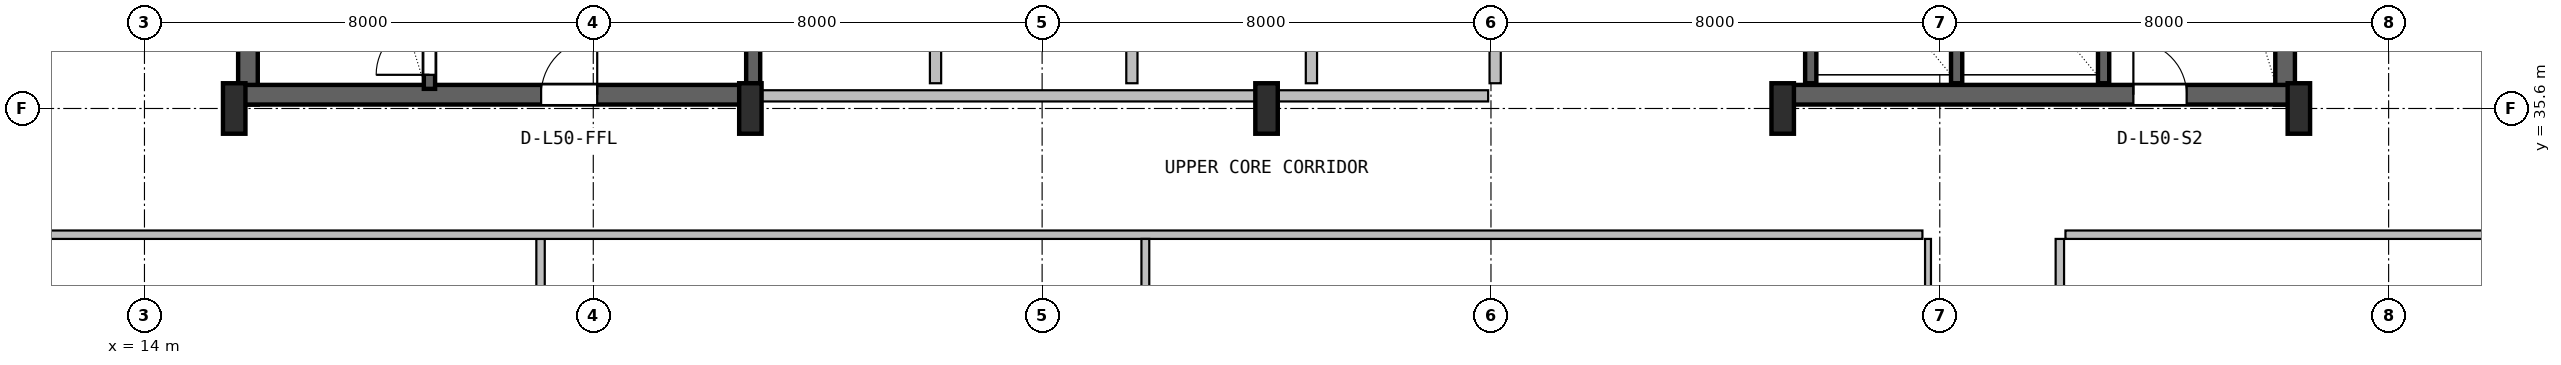
"""IFC4 building model, lengths in metres.
Left out: names, types, materials, properties, quantities, classifications, styles, units other than length and angle.
Written with IfcOpenShell. Run it as: python <this file> out.ifc"""

import sys

from ifc_helpers import new_model, si_unit, direction, frame, frame_2d, origin, origin_2d, place, context, subcontext, project, spatial, rectangle, i_section, extrude, source, transform, mapped, element, fill, save


model = new_model("IFC4")
c1 = context("Model", 3, precision=1e-05, world=origin(), true_north=direction((0.0, 1.0)))
c2 = subcontext(c1, "Body", "Model", "MODEL_VIEW")
j1 = project(units=[si_unit("LENGTHUNIT", "METRE"), si_unit("PLANEANGLEUNIT", "RADIAN")], contexts=[c1])
p1 = place(None, origin())
s1 = spatial("IfcSite", under=j1, at=p1, CompositionType="ELEMENT")
p2 = place(p1, origin())
s2 = spatial("IfcBuilding", under=s1, at=p2, CompositionType="ELEMENT")
p3 = place(p2, frame((0.0, 0.0, 203.6)))
s3 = spatial("IfcBuildingStorey", under=s2, at=p3, CompositionType="ELEMENT", Elevation=203.6)
for number, where, z_axis, x_axis in (
    (1, (15.845, 35.67, 0.0), (0.0, 0.0, 1.0), (0.0, 1.0, 0.0)),
    (2, (52.155, 35.67, 0.0), (0.0, 0.0, 1.0), (0.0, 1.0, 0.0)),
):
    element("IfcWall", number, at=place(p3, frame(where, z_axis=z_axis, x_axis=x_axis)), inside=s3, PredefinedType="SHEAR", context=c2, shape_type="SweptSolid", body=[
        extrude(rectangle(XDim=11.13, YDim=0.35, at=frame_2d((5.565, 0.0))), origin(), (0.0, 0.0, 1.0), 3.55),
    ])
p4 = place(p3, frame((15.67, 35.845, 0.0), z_axis=(0.0, 0.0, 1.0), x_axis=(1.0, 0.0, 0.0)))
e3 = element("IfcWall", 3, at=p4, inside=s3, PredefinedType="SHEAR", context=c2, shape_type="SweptSolid", body=[
    extrude(rectangle(XDim=9.13, YDim=0.35, at=frame_2d((4.565, 0.0))), origin(), (0.0, 0.0, 1.0), 3.55),
])
p5 = place(p4, frame((5.4, 0.0, 0.0)))
e4 = element("IfcOpeningElement", 4, at=p5, cuts=e3, PredefinedType="OPENING", context=c2, shape_type="SweptSolid", body=[
    extrude(rectangle(XDim=1.0, YDim=2.1, at=frame_2d((0.5, 1.05))), frame((0.0, 0.185, 0.0), z_axis=(0.0, -1.0, 0.0), x_axis=(1.0, 0.0, 0.0)), (0.0, 0.0, 1.0), 0.37),
])
p6 = place(p3, frame((43.2, 35.845, 0.0), z_axis=(0.0, 0.0, 1.0), x_axis=(1.0, 0.0, 0.0)))
e5 = element("IfcWall", 5, at=p6, inside=s3, PredefinedType="SHEAR", context=c2, shape_type="SweptSolid", body=[
    extrude(rectangle(XDim=9.13, YDim=0.35, at=frame_2d((4.565, 0.0))), origin(), (0.0, 0.0, 1.0), 3.55),
])
p7 = place(p6, frame((6.25, 0.0, 0.0)))
e6 = element("IfcOpeningElement", 6, at=p7, cuts=e5, PredefinedType="OPENING", context=c2, shape_type="SweptSolid", body=[
    extrude(rectangle(XDim=0.95, YDim=2.1, at=frame_2d((0.475, 1.05))), frame((0.0, 0.185, 0.0), z_axis=(0.0, -1.0, 0.0), x_axis=(1.0, 0.0, 0.0)), (0.0, 0.0, 1.0), 0.37),
])
m1 = source(origin(), c2, "Body", "SweptSolid", [
    extrude(i_section(OverallWidth=0.4, OverallDepth=0.9, WebThickness=0.016, FlangeThickness=0.028, FilletRadius=0.016, at=origin_2d()), origin(), (0.0, 0.0, 1.0), 3.8),
])
for number, where, z_axis, x_axis in (
    (7, (15.6, 35.6, 0.0), (0.0, 0.0, 1.0), (1.0, 0.0, 0.0)),
    (8, (24.8, 35.6, 0.0), (0.0, 0.0, 1.0), (1.0, 0.0, 0.0)),
    (9, (34.0, 35.6, 0.0), (0.0, 0.0, 1.0), (1.0, 0.0, 0.0)),
    (10, (43.2, 35.6, 0.0), (0.0, 0.0, 1.0), (1.0, 0.0, 0.0)),
    (11, (52.4, 35.6, 0.0), (0.0, 0.0, 1.0), (1.0, 0.0, 0.0)),
):
    element("IfcColumn", number, at=place(p3, frame(where, z_axis=z_axis, x_axis=x_axis)), inside=s3, PredefinedType="COLUMN", context=c2, shape_type="MappedRepresentation", body=[
        mapped(m1, transform((0.0, 0.0, 0.0), x_axis=(1.0, 0.0, 0.0), y_axis=(0.0, 1.0, 0.0), z_axis=(0.0, 0.0, 1.0), scale=1.0)),
    ])
p8 = place(p3, frame((19.08, 35.95, 0.0), z_axis=(0.0, 0.0, 1.0), x_axis=(0.0, 1.0, 0.0)))
e12 = element("IfcWall", 12, at=p8, inside=s3, PredefinedType="SHEAR", context=c2, shape_type="SweptSolid", body=[
    extrude(rectangle(XDim=9.65, YDim=0.2, at=frame_2d((4.825, 0.0))), origin(), (0.0, 0.0, 1.0), 3.55),
])
p9 = place(p8, frame((0.25, 0.0, 0.0)))
e13 = element("IfcOpeningElement", 13, at=p9, cuts=e12, PredefinedType="OPENING", context=c2, shape_type="SweptSolid", body=[
    extrude(rectangle(XDim=0.95, YDim=2.1, at=frame_2d((0.475, 1.05))), frame((0.0, 0.11, 0.0), z_axis=(0.0, -1.0, 0.0), x_axis=(1.0, 0.0, 0.0)), (0.0, 0.0, 1.0), 0.22),
])
p10 = place(p3, frame((24.85, 36.05, 0.0), z_axis=(0.0, 0.0, 1.0), x_axis=(0.0, 1.0, 0.0)))
e14 = element("IfcWall", 14, at=p10, inside=s3, PredefinedType="SHEAR", context=c2, shape_type="SweptSolid", body=[
    extrude(rectangle(XDim=10.45, YDim=0.25, at=frame_2d((5.225, 0.0))), origin(), (0.0, 0.0, 1.0), 3.55),
])
p11 = place(p3, frame((48.92, 36.05, 0.0), z_axis=(0.0, 0.0, 1.0), x_axis=(0.0, 1.0, 0.0)))
e15 = element("IfcWall", 15, at=p11, inside=s3, PredefinedType="SHEAR", context=c2, shape_type="SweptSolid", body=[
    extrude(rectangle(XDim=10.5, YDim=0.2, at=frame_2d((5.25, 0.0))), origin(), (0.0, 0.0, 1.0), 3.55),
])
for number, where, z_axis, x_axis in (
    (16, (43.7, 36.05, 0.0), (0.0, 0.0, 1.0), (0.0, 1.0, 0.0)),
    (17, (46.3, 36.05, 0.0), (0.0, 0.0, 1.0), (0.0, 1.0, 0.0)),
):
    element("IfcWall", number, at=place(p3, frame(where, z_axis=z_axis, x_axis=x_axis)), inside=s3, PredefinedType="SHEAR", context=c2, shape_type="SweptSolid", body=[
        extrude(rectangle(XDim=3.05, YDim=0.2, at=frame_2d((1.525, 0.0))), origin(), (0.0, 0.0, 1.0), 3.55),
    ])
p12 = place(p3, frame((25.0, 35.825, 0.0), z_axis=(0.0, 0.0, 1.0), x_axis=(1.0, 0.0, 0.0)))
e18 = element("IfcWall", 18, at=p12, inside=s3, PredefinedType="SOLIDWALL", context=c2, shape_type="SweptSolid", body=[
    extrude(rectangle(XDim=12.95, YDim=0.2, at=frame_2d((6.475, 0.0))), origin(), (0.0, 0.0, 1.0), 2.575),
])
for number, where, z_axis, x_axis in (
    (19, (28.1, 36.05, 0.0), (0.0, 0.0, 1.0), (0.0, 1.0, 0.0)),
    (20, (31.6, 36.05, 0.0), (0.0, 0.0, 1.0), (0.0, 1.0, 0.0)),
):
    element("IfcWall", number, at=place(p3, frame(where, z_axis=z_axis, x_axis=x_axis)), inside=s3, PredefinedType="PLUMBINGWALL", context=c2, shape_type="SweptSolid", body=[
        extrude(rectangle(XDim=3.1, YDim=0.2, at=frame_2d((1.55, 0.0))), origin(), (0.0, 0.0, 1.0), 3.53),
    ])
for number, where, z_axis, x_axis in (
    (21, (34.8, 36.05, 0.0), (0.0, 0.0, 1.0), (0.0, 1.0, 0.0)),
    (22, (38.075, 36.05, 0.0), (0.0, 0.0, 1.0), (0.0, 1.0, 0.0)),
):
    element("IfcWall", number, at=place(p3, frame(where, z_axis=z_axis, x_axis=x_axis)), inside=s3, PredefinedType="SOLIDWALL", context=c2, shape_type="SweptSolid", body=[
        extrude(rectangle(XDim=3.1, YDim=0.2, at=frame_2d((1.55, 0.0))), origin(), (0.0, 0.0, 1.0), 3.53),
    ])
p13 = place(p3, frame((21.06, 17.645, 0.0), z_axis=(0.0, 0.0, 1.0), x_axis=(0.0, 1.0, 0.0)))
e23 = element("IfcWall", 23, at=p13, inside=s3, PredefinedType="PARTITIONING", context=c2, shape_type="SweptSolid", body=[
    extrude(rectangle(XDim=15.63, YDim=0.15, at=frame_2d((7.815, 0.0))), origin(), (0.0, 0.0, 1.0), 3.222),
])
p14 = place(p3, frame((9.68, 33.35, 0.0), z_axis=(0.0, 0.0, 1.0), x_axis=(1.0, 0.0, 0.0)))
e24 = element("IfcWall", 24, at=p14, inside=s3, PredefinedType="PARTITIONING", context=c2, shape_type="SweptSolid", body=[
    extrude(rectangle(XDim=36.01, YDim=0.15, at=frame_2d((18.005, 0.0))), origin(), (0.0, 0.0, 1.0), 2.908),
])
p15 = place(p3, frame((31.84, 17.645, 0.0), z_axis=(0.0, 0.0, 1.0), x_axis=(0.0, 1.0, 0.0)))
e25 = element("IfcWall", 25, at=p15, inside=s3, PredefinedType="PARTITIONING", context=c2, shape_type="SweptSolid", body=[
    extrude(rectangle(XDim=15.63, YDim=0.14, at=frame_2d((7.815, 0.0))), origin(), (0.0, 0.0, 1.0), 2.908),
])
p16 = place(p3, frame((45.79, 17.645, 0.0), z_axis=(0.0, 0.0, 1.0), x_axis=(0.0, 1.0, 0.0)))
e26 = element("IfcWall", 26, at=p16, inside=s3, PredefinedType="PARTITIONING", context=c2, shape_type="SweptSolid", body=[
    extrude(rectangle(XDim=15.63, YDim=0.105, at=frame_2d((7.815, 0.0))), origin(), (0.0, 0.0, 1.0), 3.222),
])
p17 = place(p16, frame((7.375, 0.0, 0.0)))
e27 = element("IfcOpeningElement", 27, at=p17, cuts=e26, PredefinedType="OPENING", context=c2, shape_type="SweptSolid", body=[
    extrude(rectangle(XDim=0.88, YDim=2.06, at=frame_2d((0.44, 1.03))), frame((0.0, 0.062, 0.0), z_axis=(0.0, -1.0, 0.0), x_axis=(1.0, 0.0, 0.0)), (0.0, 0.0, 1.0), 0.125),
])
p18 = place(p3, frame((48.24, 33.35, 0.0), z_axis=(0.0, 0.0, 1.0), x_axis=(1.0, 0.0, 0.0)))
e28 = element("IfcWall", 28, at=p18, inside=s3, PredefinedType="PARTITIONING", context=c2, shape_type="SweptSolid", body=[
    extrude(rectangle(XDim=10.08, YDim=0.15, at=frame_2d((5.04, 0.0))), origin(), (0.0, 0.0, 1.0), 3.171),
])
p19 = place(p3, frame((48.14, 10.38, 0.0), z_axis=(0.0, 0.0, 1.0), x_axis=(0.0, 1.0, 0.0)))
e29 = element("IfcWall", 29, at=p19, inside=s3, PredefinedType="PARTITIONING", context=c2, shape_type="SweptSolid", body=[
    extrude(rectangle(XDim=22.895, YDim=0.15, at=frame_2d((11.448, 0.0))), origin(), (0.0, 0.0, 1.0), 3.171),
])
p20 = place(p19, frame((11.43, 0.0, 0.0)))
e30 = element("IfcOpeningElement", 30, at=p20, cuts=e29, PredefinedType="OPENING", context=c2, shape_type="SweptSolid", body=[
    extrude(rectangle(XDim=0.92, YDim=2.08, at=frame_2d((0.46, 1.04))), frame((0.0, 0.085, 0.0), z_axis=(0.0, -1.0, 0.0), x_axis=(1.0, 0.0, 0.0)), (0.0, 0.0, 1.0), 0.17),
])
m2 = source(origin(), c2, "Body", "SweptSolid", [
    extrude(rectangle(XDim=0.95, YDim=2.1, at=frame_2d((0.475, 1.05))), frame((0.0, 0.025, 0.0), z_axis=(0.0, -1.0, 0.0), x_axis=(1.0, 0.0, 0.0)), (0.0, 0.0, 1.0), 0.05),
])
p21 = place(p9, origin())
e31 = element("IfcDoor", 31, at=p21, inside=s3, OperationType="SINGLE_SWING_LEFT", PredefinedType="DOOR", context=c2, shape_type="MappedRepresentation", body=[
    mapped(m2, transform((0.0, 0.0, 0.0), x_axis=(1.0, 0.0, 0.0), y_axis=(0.0, 1.0, 0.0), z_axis=(0.0, 0.0, 1.0), scale=1.0)),
])
fill(e13, e31)
m3 = source(origin(), c2, "Body", "SweptSolid", [
    extrude(rectangle(XDim=1.0, YDim=2.1, at=frame_2d((0.5, 1.05))), frame((0.0, 0.025, 0.0), z_axis=(0.0, -1.0, 0.0), x_axis=(1.0, 0.0, 0.0)), (0.0, 0.0, 1.0), 0.05),
])
p22 = place(p5, origin())
e32 = element("IfcDoor", 32, at=p22, inside=s3, OperationType="SINGLE_SWING_RIGHT", PredefinedType="DOOR", context=c2, shape_type="MappedRepresentation", body=[
    mapped(m3, transform((0.0, 0.0, 0.0), x_axis=(1.0, 0.0, 0.0), y_axis=(0.0, 1.0, 0.0), z_axis=(0.0, 0.0, 1.0), scale=1.0)),
])
fill(e4, e32)
p23 = place(p7, origin())
e33 = element("IfcDoor", 33, at=p23, inside=s3, OperationType="SINGLE_SWING_LEFT", PredefinedType="DOOR", context=c2, shape_type="MappedRepresentation", body=[
    mapped(m2, transform((0.0, 0.0, 0.0), x_axis=(1.0, 0.0, 0.0), y_axis=(0.0, 1.0, 0.0), z_axis=(0.0, 0.0, 1.0), scale=1.0)),
])
fill(e6, e33)
save(model, sys.argv[1])
